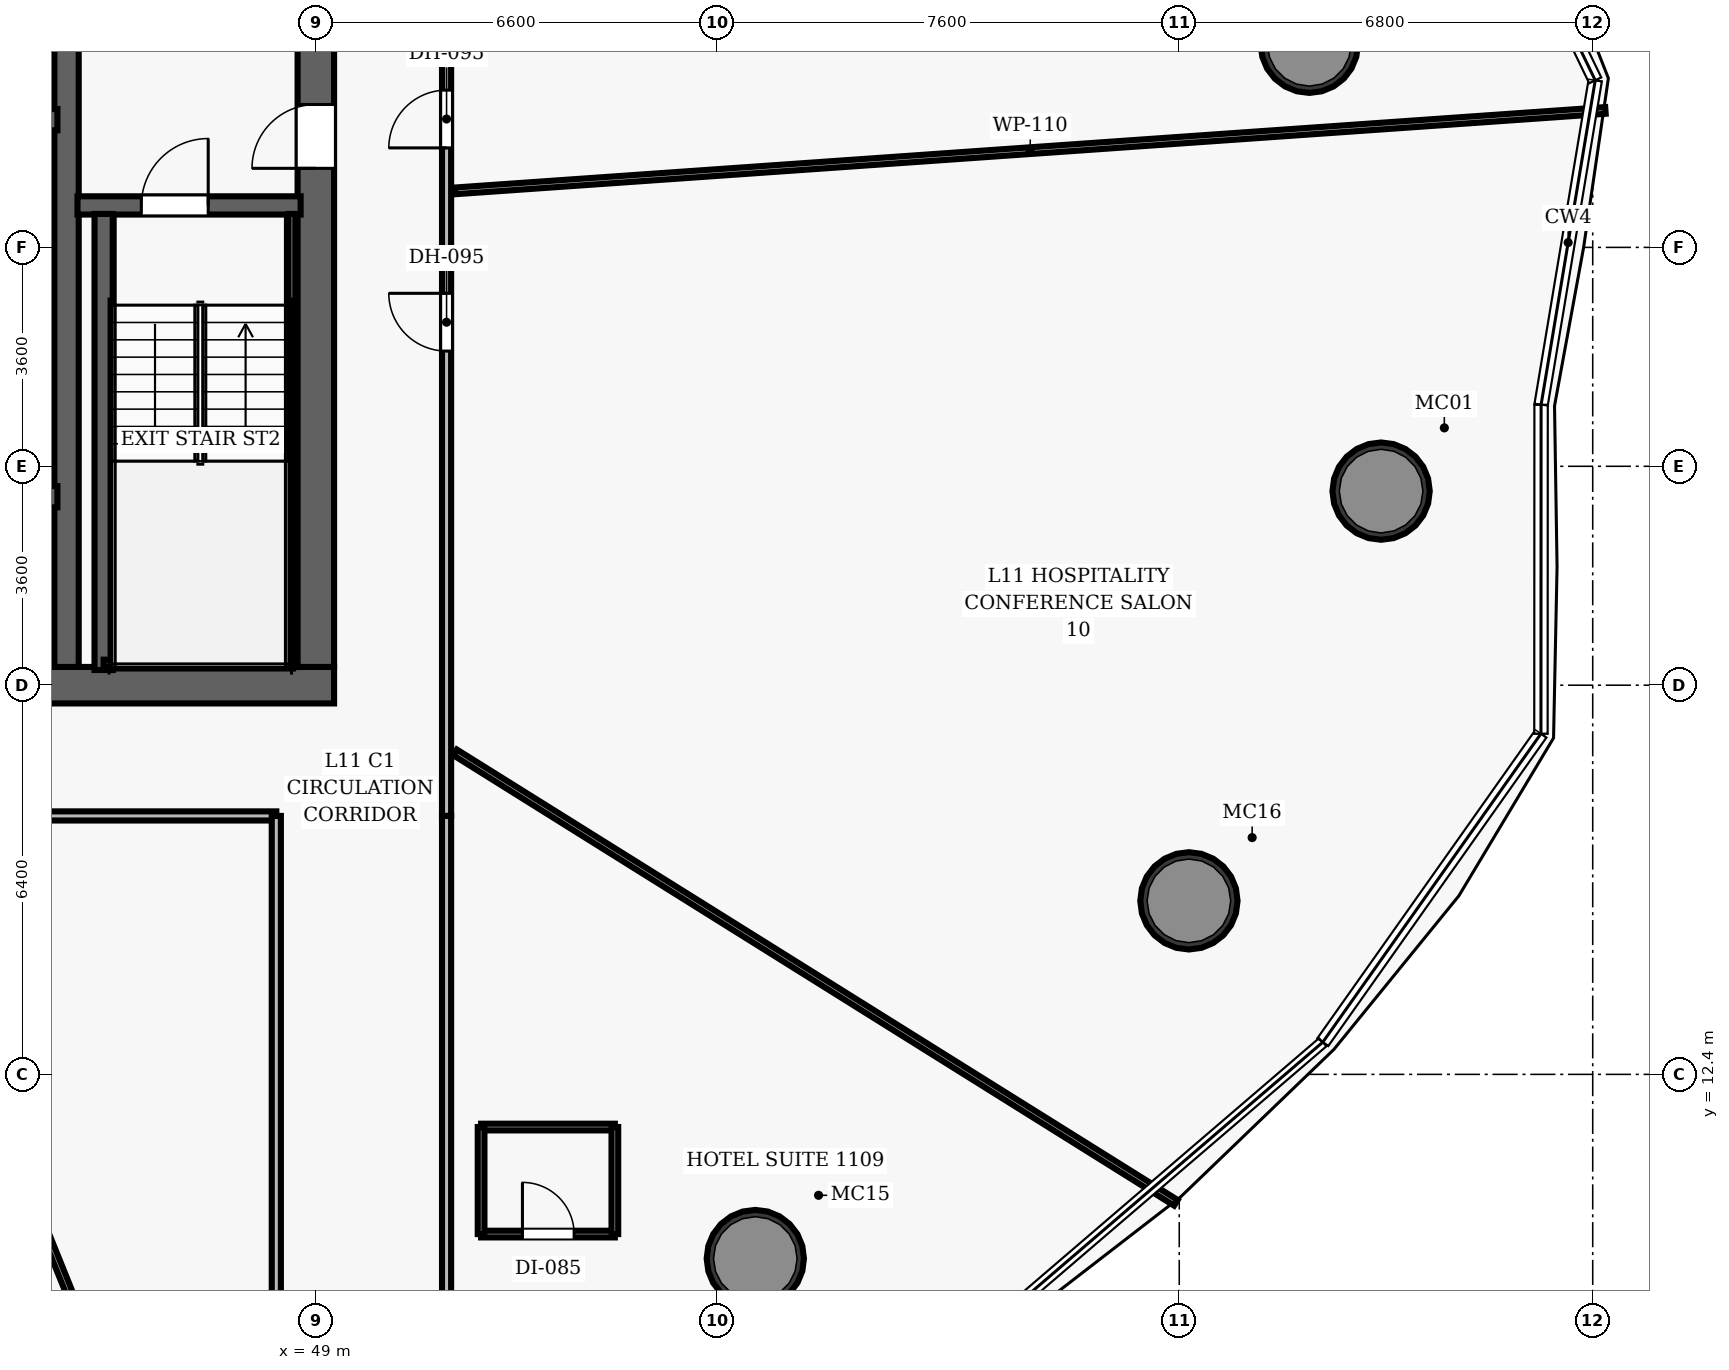
"""IFC4 building model, lengths in metres.
Left out: names, types, materials, properties, quantities, classifications, styles, units other than length and angle.
Written with IfcOpenShell. Run it as: python <this file> out.ifc"""

import sys

from ifc_helpers import new_model, si_unit, direction, frame, frame_2d, origin, origin_2d, place, context, subcontext, project, spatial, rectangle, hollow_circle, extrude, element, fill, save


model = new_model("IFC4")
c1 = context("Model", 3, precision=1e-05, world=origin(), true_north=direction((0.0, 1.0)))
c2 = subcontext(c1, "Body", "Model", "MODEL_VIEW")
j1 = project(units=[si_unit("LENGTHUNIT", "METRE"), si_unit("PLANEANGLEUNIT", "RADIAN")], contexts=[c1])
p1 = place(None, origin())
s1 = spatial("IfcSite", under=j1, at=p1, CompositionType="ELEMENT")
p2 = place(p1, origin())
s2 = spatial("IfcBuilding", under=s1, at=p2, CompositionType="ELEMENT")
p3 = place(p2, frame((0.0, 0.0, 55.4)))
s3 = spatial("IfcBuildingStorey", under=s2, at=p3, CompositionType="ELEMENT", Elevation=55.4)
p4 = place(p3, frame((26.7, 18.8, 0.0), z_axis=(0.0, 0.0, 1.0), x_axis=(1.0, 0.0, 0.0)))
e1 = element("IfcWall", 1, at=p4, inside=s3, PredefinedType="SHEAR", context=c2, shape_type="SweptSolid", body=[
    extrude(rectangle(XDim=22.6, YDim=0.6, at=frame_2d((11.3, 0.0))), origin(), (0.0, 0.0, 1.0), 3.5),
])
p5 = place(p4, frame((14.52, 0.0, 0.0)))
e2 = element("IfcOpeningElement", 2, at=p5, cuts=e1, PredefinedType="OPENING", context=c2, shape_type="SweptSolid", body=[
    extrude(rectangle(XDim=1.05, YDim=2.15, at=frame_2d((0.525, 1.075))), frame((0.0, 0.31, 0.0), z_axis=(0.0, -1.0, 0.0), x_axis=(1.0, 0.0, 0.0)), (0.0, 0.0, 1.0), 0.62),
])
p6 = place(p3, frame((49.0, 19.1, 0.0), z_axis=(0.0, 0.0, 1.0), x_axis=(0.0, 1.0, 0.0)))
e3 = element("IfcWall", 3, at=p6, inside=s3, PredefinedType="SHEAR", context=c2, shape_type="SweptSolid", body=[
    extrude(rectangle(XDim=13.8, YDim=0.6, at=frame_2d((6.9, 0.0))), origin(), (0.0, 0.0, 1.0), 3.5),
])
p7 = place(p6, frame((8.2, 0.0, 0.0)))
e4 = element("IfcOpeningElement", 4, at=p7, cuts=e3, PredefinedType="OPENING", context=c2, shape_type="SweptSolid", body=[
    extrude(rectangle(XDim=1.05, YDim=2.15, at=frame_2d((0.525, 1.075))), frame((0.0, 0.31, 0.0), z_axis=(0.0, -1.0, 0.0), x_axis=(1.0, 0.0, 0.0)), (0.0, 0.0, 1.0), 0.62),
])
p8 = place(p3, frame((44.9, 19.1, 0.0), z_axis=(0.0, 0.0, 1.0), x_axis=(0.0, 1.0, 0.0)))
e5 = element("IfcWall", 5, at=p8, inside=s3, PredefinedType="SHEAR", context=c2, shape_type="SweptSolid", body=[
    extrude(rectangle(XDim=13.8, YDim=0.4, at=frame_2d((6.9, 0.0))), origin(), (0.0, 0.0, 1.0), 3.5),
])
for number, where, z_axis, x_axis in (
    (6, (66.52, 21.992, 0.0), (0.0, 0.0, 1.0), (1.0, 0.0, 0.0)),
    (7, (65.339, 29.34, 0.0), (0.0, 0.0, 1.0), (1.0, 0.0, 0.0)),
    (8, (56.228, 9.371, 0.0), (0.0, 0.0, 1.0), (1.0, 0.0, 0.0)),
    (9, (63.359, 15.254, 0.0), (0.0, 0.0, 1.0), (1.0, 0.0, 0.0)),
):
    element("IfcColumn", number, at=place(p3, frame(where, z_axis=z_axis, x_axis=x_axis)), inside=s3, PredefinedType="COLUMN", context=c2, shape_type="SweptSolid", body=[
        extrude(hollow_circle(Radius=0.8, WallThickness=0.06, at=origin_2d()), origin(), (0.0, 0.0, 1.0), 3.5),
    ])
p9 = place(p3, frame((45.08, 26.69, 0.0), z_axis=(0.0, 0.0, 1.0), x_axis=(1.0, 0.0, 0.0)))
e10 = element("IfcWall", 10, at=p9, inside=s3, PredefinedType="SHEAR", context=c2, shape_type="SweptSolid", body=[
    extrude(rectangle(XDim=3.67, YDim=0.3, at=frame_2d((1.835, 0.0))), origin(), (0.0, 0.0, 1.0), 3.5),
])
p10 = place(p9, frame((1.05, 0.0, 0.0)))
e11 = element("IfcOpeningElement", 11, at=p10, cuts=e10, PredefinedType="OPENING", context=c2, shape_type="SweptSolid", body=[
    extrude(rectangle(XDim=1.1, YDim=2.15, at=frame_2d((0.55, 1.075))), frame((0.0, 0.16, 0.0), z_axis=(0.0, -1.0, 0.0), x_axis=(1.0, 0.0, 0.0)), (0.0, 0.0, 1.0), 0.32),
])
p11 = place(p3, frame((45.51, 19.05, 0.0), z_axis=(0.0, 0.0, 1.0), x_axis=(0.0, 1.0, 0.0)))
e12 = element("IfcWall", 12, at=p11, inside=s3, PredefinedType="SHEAR", context=c2, shape_type="SweptSolid", body=[
    extrude(rectangle(XDim=7.5, YDim=0.3, at=frame_2d((3.75, 0.0))), origin(), (0.0, 0.0, 1.0), 3.5),
])
p12 = place(p3, frame((48.605, 19.1, 0.0), z_axis=(0.0, 0.0, 1.0), x_axis=(0.0, 1.0, 0.0)))
e13 = element("IfcWall", 13, at=p12, inside=s3, PredefinedType="SHEAR", context=c2, shape_type="SweptSolid", body=[
    extrude(rectangle(XDim=7.45, YDim=0.12, at=frame_2d((3.725, 0.0))), origin(), (0.0, 0.0, 1.0), 3.5),
])
p13 = place(p3, frame((45.51, 19.16, 0.0), z_axis=(0.0, 0.0, 1.0), x_axis=(1.0, 0.0, 0.0)))
e14 = element("IfcWall", 14, at=p13, inside=s3, PredefinedType="SHEAR", context=c2, shape_type="SweptSolid", body=[
    extrude(rectangle(XDim=3.095, YDim=0.12, at=frame_2d((1.547, 0.0))), origin(), (0.0, 0.0, 1.0), 3.5),
])
for number, where, z_axis, x_axis in (
    (15, (42.72, 21.9, 0.0), (0.0, 0.0, 1.0), (1.0, 0.0, 0.0)),
    (16, (42.72, 28.1, 0.0), (0.0, 0.0, 1.0), (1.0, 0.0, 0.0)),
):
    element("IfcWall", number, at=place(p3, frame(where, z_axis=z_axis, x_axis=x_axis)), inside=s3, PredefinedType="SHEAR", context=c2, shape_type="SweptSolid", body=[
        extrude(rectangle(XDim=2.03, YDim=0.35, at=frame_2d((1.015, 0.0))), origin(), (0.0, 0.0, 1.0), 2.6),
    ])
p14 = place(p3, frame((24.85, 16.65, 0.0), z_axis=(0.0, 0.0, 1.0), x_axis=(1.0, 0.0, 0.0)))
e17 = element("IfcWall", 17, at=p14, inside=s3, PredefinedType="PARTITIONING", context=c2, shape_type="SweptSolid", body=[
    extrude(rectangle(XDim=23.5, YDim=0.15, at=frame_2d((11.75, 0.0))), origin(), (0.0, 0.0, 1.0), 2.6),
])
p15 = place(p14, frame((8.216, 0.0, 0.0)))
e18 = element("IfcOpeningElement", 18, at=p15, cuts=e17, PredefinedType="OPENING", context=c2, shape_type="SweptSolid", body=[
    extrude(rectangle(XDim=0.95, YDim=2.15, at=frame_2d((0.475, 1.075))), frame((0.0, 0.085, 0.0), z_axis=(0.0, -1.0, 0.0), x_axis=(1.0, 0.0, 0.0)), (0.0, 0.0, 1.0), 0.17),
])
p16 = place(p14, frame((15.103, 0.0, 0.0)))
e19 = element("IfcOpeningElement", 19, at=p16, cuts=e17, PredefinedType="OPENING", context=c2, shape_type="SweptSolid", body=[
    extrude(rectangle(XDim=0.95, YDim=2.15, at=frame_2d((0.475, 1.075))), frame((0.0, 0.085, 0.0), z_axis=(0.0, -1.0, 0.0), x_axis=(1.0, 0.0, 0.0)), (0.0, 0.0, 1.0), 0.17),
])
p17 = place(p14, frame((17.91, 0.0, 0.0)))
e20 = element("IfcOpeningElement", 20, at=p17, cuts=e17, PredefinedType="OPENING", context=c2, shape_type="SweptSolid", body=[
    extrude(rectangle(XDim=0.95, YDim=2.15, at=frame_2d((0.475, 1.075))), frame((0.0, 0.085, 0.0), z_axis=(0.0, -1.0, 0.0), x_axis=(1.0, 0.0, 0.0)), (0.0, 0.0, 1.0), 0.17),
])
p18 = place(p3, frame((51.15, 16.65, 0.0), z_axis=(0.0, 0.0, 1.0), x_axis=(0.0, 1.0, 0.0)))
e21 = element("IfcWall", 21, at=p18, inside=s3, PredefinedType="PARTITIONING", context=c2, shape_type="SweptSolid", body=[
    extrude(rectangle(XDim=15.9, YDim=0.15, at=frame_2d((7.95, 0.0))), origin(), (0.0, 0.0, 1.0), 2.6),
])
p19 = place(p18, frame((10.986, 0.0, 0.0)))
e22 = element("IfcOpeningElement", 22, at=p19, cuts=e21, PredefinedType="OPENING", context=c2, shape_type="SweptSolid", body=[
    extrude(rectangle(XDim=0.95, YDim=2.15, at=frame_2d((0.475, 1.075))), frame((0.0, 0.085, 0.0), z_axis=(0.0, -1.0, 0.0), x_axis=(1.0, 0.0, 0.0)), (0.0, 0.0, 1.0), 0.17),
])
p20 = place(p18, frame((7.645, 0.0, 0.0)))
e23 = element("IfcOpeningElement", 23, at=p20, cuts=e21, PredefinedType="OPENING", context=c2, shape_type="SweptSolid", body=[
    extrude(rectangle(XDim=0.95, YDim=2.15, at=frame_2d((0.475, 1.075))), frame((0.0, 0.085, 0.0), z_axis=(0.0, -1.0, 0.0), x_axis=(1.0, 0.0, 0.0)), (0.0, 0.0, 1.0), 0.17),
])
for number, where, z_axis, x_axis in (
    (24, (48.35, 6.5, 0.0), (0.0, 0.0, 1.0), (0.0, 1.0, 0.0)),
    (25, (51.15, 6.5, 0.0), (0.0, 0.0, 1.0), (0.0, 1.0, 0.0)),
):
    element("IfcWall", number, at=place(p3, frame(where, z_axis=z_axis, x_axis=x_axis)), inside=s3, PredefinedType="PARTITIONING", context=c2, shape_type="SweptSolid", body=[
        extrude(rectangle(XDim=10.15, YDim=0.15, at=frame_2d((5.075, 0.0))), origin(), (0.0, 0.0, 1.0), 2.6),
    ])
p21 = place(p3, frame((51.29, 26.929, 0.0), z_axis=(0.0, 0.0, 1.0), x_axis=(0.997563842889, 0.069759439227, 0.0)))
e26 = element("IfcWall", 26, at=p21, inside=s3, PredefinedType="PARTITIONING", context=c2, shape_type="SweptSolid", body=[
    extrude(rectangle(XDim=18.965, YDim=0.11, at=frame_2d((9.482, 0.0))), origin(), (0.0, 0.0, 1.0), 2.6),
])
p22 = place(p3, frame((41.834, 16.51, 0.0), z_axis=(0.0, 0.0, 1.0), x_axis=(0.374602418555, -0.927185541309, 0.0)))
e27 = element("IfcWall", 27, at=p22, inside=s3, PredefinedType="PARTITIONING", context=c2, shape_type="SweptSolid", body=[
    extrude(rectangle(XDim=15.206, YDim=0.11, at=frame_2d((7.603, 0.0))), origin(), (0.0, 0.0, 1.0), 2.6),
])
p23 = place(p3, frame((51.29, 17.696, 0.0), z_axis=(0.0, 0.0, 1.0), x_axis=(0.848046378233, -0.529922013476, 0.0)))
e28 = element("IfcWall", 28, at=p23, inside=s3, PredefinedType="PARTITIONING", context=c2, shape_type="SweptSolid", body=[
    extrude(rectangle(XDim=13.979, YDim=0.11, at=frame_2d((6.989, 0.0))), origin(), (0.0, 0.0, 1.0), 2.6),
])
p24 = place(p3, frame((51.718, 9.774, 0.0), z_axis=(0.0, 0.0, 1.0), x_axis=(1.0, 0.0, 0.0)))
e29 = element("IfcWall", 29, at=p24, inside=s3, PredefinedType="PARTITIONING", context=c2, shape_type="SweptSolid", body=[
    extrude(rectangle(XDim=2.2, YDim=0.11, at=frame_2d((1.1, 0.0))), origin(), (0.0, 0.0, 1.0), 2.6),
])
p25 = place(p24, frame((0.68, 0.0, 0.0)))
e30 = element("IfcOpeningElement", 30, at=p25, cuts=e29, PredefinedType="OPENING", context=c2, shape_type="SweptSolid", body=[
    extrude(rectangle(XDim=0.85, YDim=2.1, at=frame_2d((0.425, 1.05))), frame((0.0, 0.065, 0.0), z_axis=(0.0, -1.0, 0.0), x_axis=(1.0, 0.0, 0.0)), (0.0, 0.0, 1.0), 0.13),
])
p26 = place(p3, frame((51.718, 11.534, 0.0), z_axis=(0.0, 0.0, 1.0), x_axis=(1.0, 0.0, 0.0)))
e31 = element("IfcWall", 31, at=p26, inside=s3, PredefinedType="PARTITIONING", context=c2, shape_type="SweptSolid", body=[
    extrude(rectangle(XDim=2.2, YDim=0.11, at=frame_2d((1.1, 0.0))), origin(), (0.0, 0.0, 1.0), 2.6),
])
for number, where, z_axis, x_axis in (
    (32, (51.718, 9.774, 0.0), (0.0, 0.0, 1.0), (0.0, 1.0, 0.0)),
    (33, (53.918, 9.774, 0.0), (0.0, 0.0, 1.0), (0.0, 1.0, 0.0)),
):
    element("IfcWall", number, at=place(p3, frame(where, z_axis=z_axis, x_axis=x_axis)), inside=s3, PredefinedType="PARTITIONING", context=c2, shape_type="SweptSolid", body=[
        extrude(rectangle(XDim=1.76, YDim=0.11, at=frame_2d((0.88, 0.0))), origin(), (0.0, 0.0, 1.0), 2.6),
    ])
p27 = place(p10, origin())
e34 = element("IfcDoor", 34, at=p27, inside=s3, OperationType="SINGLE_SWING_RIGHT", PredefinedType="DOOR", context=c2, shape_type="SweptSolid", body=[
    extrude(rectangle(XDim=1.1, YDim=2.15, at=frame_2d((0.55, 1.075))), frame((0.0, 0.025, 0.0), z_axis=(0.0, -1.0, 0.0), x_axis=(1.0, 0.0, 0.0)), (0.0, 0.0, 1.0), 0.05),
])
fill(e11, e34)
p28 = place(p7, origin())
e35 = element("IfcDoor", 35, at=p28, inside=s3, OperationType="SINGLE_SWING_LEFT", PredefinedType="DOOR", context=c2, shape_type="SweptSolid", body=[
    extrude(rectangle(XDim=1.05, YDim=2.15, at=frame_2d((0.525, 1.075))), frame((0.0, 0.025, 0.0), z_axis=(0.0, -1.0, 0.0), x_axis=(1.0, 0.0, 0.0)), (0.0, 0.0, 1.0), 0.05),
])
fill(e4, e35)
p29 = place(p19, origin())
e36 = element("IfcDoor", 36, at=p29, inside=s3, OperationType="SINGLE_SWING_LEFT", PredefinedType="DOOR", context=c2, shape_type="SweptSolid", body=[
    extrude(rectangle(XDim=0.95, YDim=2.15, at=frame_2d((0.475, 1.075))), frame((0.0, 0.025, 0.0), z_axis=(0.0, -1.0, 0.0), x_axis=(1.0, 0.0, 0.0)), (0.0, 0.0, 1.0), 0.05),
])
fill(e22, e36)
p30 = place(p25, origin())
e37 = element("IfcDoor", 37, at=p30, inside=s3, OperationType="SINGLE_SWING_LEFT", PredefinedType="DOOR", context=c2, shape_type="SweptSolid", body=[
    extrude(rectangle(XDim=0.85, YDim=2.1, at=frame_2d((0.425, 1.05))), frame((0.0, 0.025, 0.0), z_axis=(0.0, -1.0, 0.0), x_axis=(1.0, 0.0, 0.0)), (0.0, 0.0, 1.0), 0.05),
])
fill(e30, e37)
p31 = place(p20, origin())
e38 = element("IfcDoor", 38, at=p31, inside=s3, OperationType="SINGLE_SWING_RIGHT", PredefinedType="DOOR", context=c2, shape_type="SweptSolid", body=[
    extrude(rectangle(XDim=0.95, YDim=2.15, at=frame_2d((0.475, 1.075))), frame((0.0, 0.025, 0.0), z_axis=(0.0, -1.0, 0.0), x_axis=(1.0, 0.0, 0.0)), (0.0, 0.0, 1.0), 0.05),
])
fill(e23, e38)
save(model, sys.argv[1])
